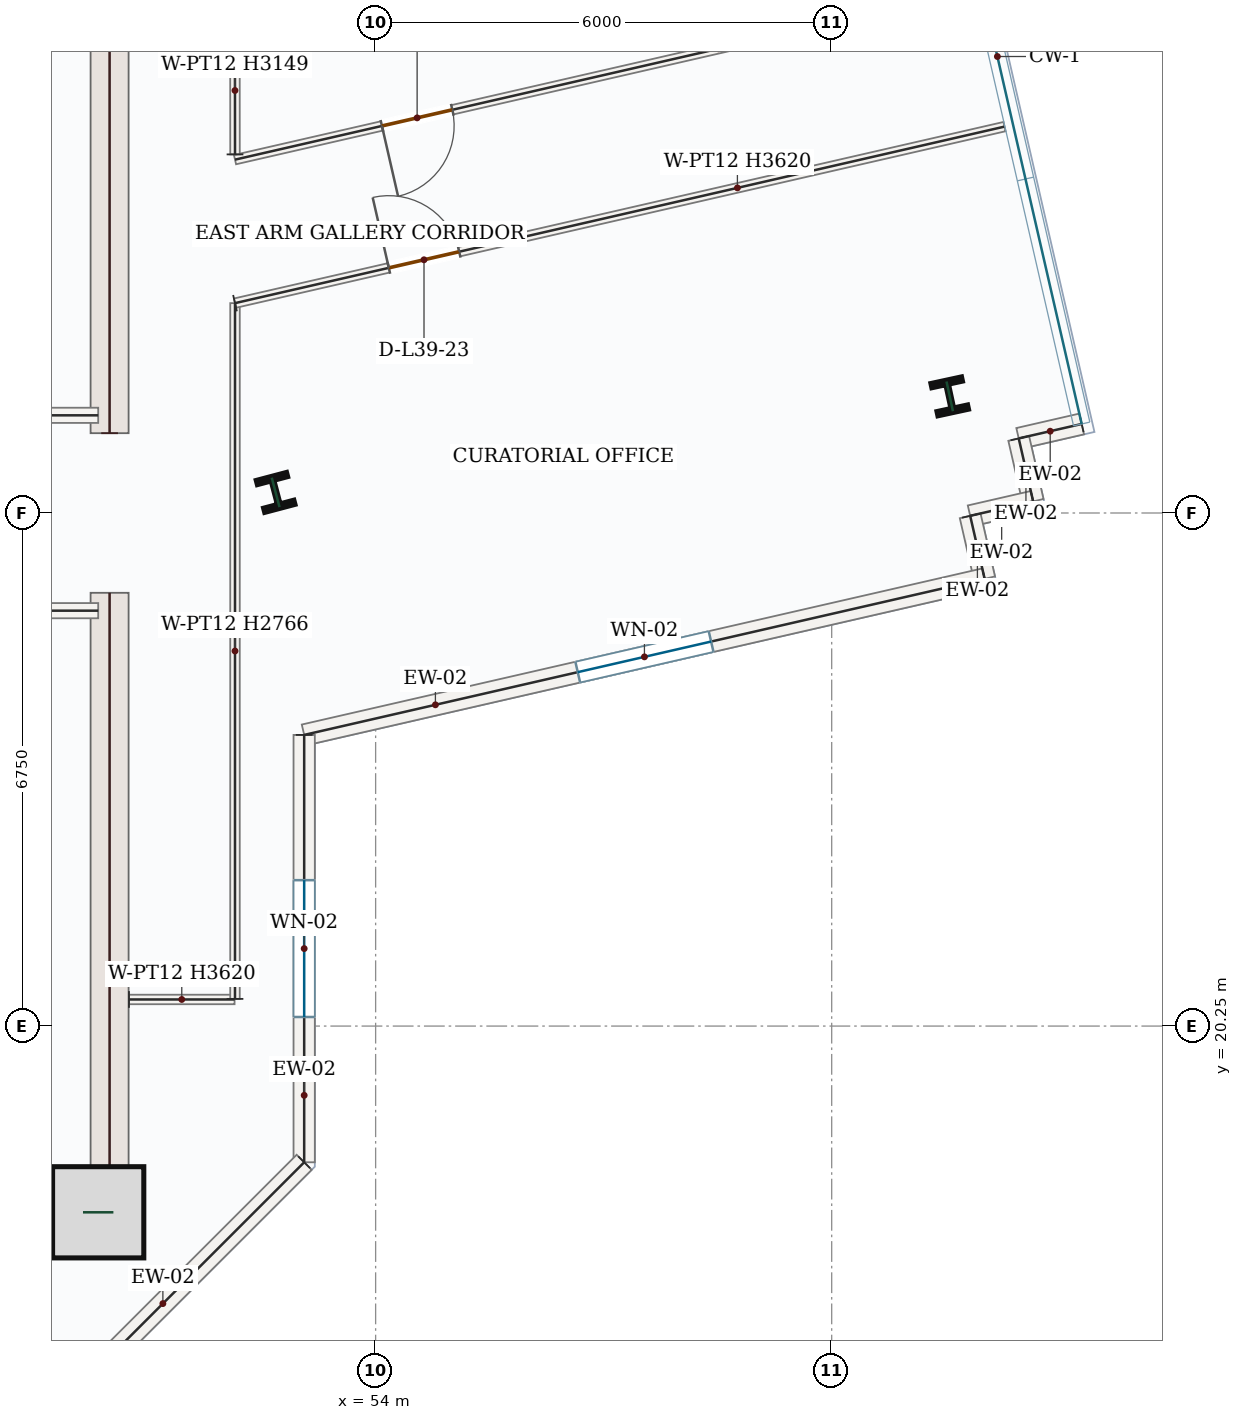
"""IFC4 building model, lengths in metres.
Left out: names, types, materials, properties, quantities, classifications, styles, units other than length and angle.
Written with IfcOpenShell. Run it as: python <this file> out.ifc"""

import sys

from ifc_helpers import new_model, si_unit, direction, frame, frame_2d, origin, origin_2d, place, context, subcontext, project, spatial, rectangle, i_section, extrude, source, transform, mapped, element, fill, save


model = new_model("IFC4")
c1 = context("Model", 3, precision=1e-05, world=origin(), true_north=direction((0.0, 1.0)))
c2 = subcontext(c1, "Body", "Model", "MODEL_VIEW")
j1 = project(units=[si_unit("LENGTHUNIT", "METRE"), si_unit("PLANEANGLEUNIT", "RADIAN")], contexts=[c1])
p1 = place(None, origin())
s1 = spatial("IfcSite", under=j1, at=p1, CompositionType="ELEMENT")
p2 = place(p1, origin())
s2 = spatial("IfcBuilding", under=s1, at=p2, CompositionType="ELEMENT")
p3 = place(p2, frame((0.0, 0.0, 170.7)))
s3 = spatial("IfcBuildingStorey", under=s2, at=p3, CompositionType="ELEMENT", Elevation=170.7)
m1 = source(origin(), c2, "Body", "SweptSolid", [
    extrude(rectangle(XDim=8.55, YDim=0.5, at=frame_2d((4.275, 0.0))), origin(), (0.0, 0.0, 1.0), 3.62),
])
for number, where, z_axis, x_axis in (
    (1, (50.5, 17.4, 0.0), (0.0, 0.0, 1.0), (0.0, 1.0, 0.0)),
    (2, (50.5, 28.05, 0.0), (0.0, 0.0, 1.0), (0.0, 1.0, 0.0)),
):
    element("IfcWall", number, at=place(p3, frame(where, z_axis=z_axis, x_axis=x_axis)), inside=s3, PredefinedType="SHEAR", context=c2, shape_type="MappedRepresentation", body=[
        mapped(m1, transform((0.0, 0.0, 0.0), x_axis=(1.0, 0.0, 0.0), y_axis=(0.0, 1.0, 0.0), z_axis=(0.0, 0.0, 1.0), scale=1.0)),
    ])
m2 = source(origin(), c2, "Body", "SweptSolid", [
    extrude(rectangle(XDim=7.0, YDim=0.5, at=frame_2d((3.5, 0.0))), origin(), (0.0, 0.0, 1.0), 3.62),
])
p4 = place(p3, frame((43.25, 17.65, 0.0), z_axis=(0.0, 0.0, 1.0), x_axis=(1.0, 0.0, 0.0)))
e3 = element("IfcWall", 3, at=p4, inside=s3, PredefinedType="SHEAR", context=c2, shape_type="MappedRepresentation", body=[
    mapped(m2, transform((0.0, 0.0, 0.0), x_axis=(1.0, 0.0, 0.0), y_axis=(0.0, 1.0, 0.0), z_axis=(0.0, 0.0, 1.0), scale=1.0)),
])
m3 = source(origin(), c2, "Body", "SweptSolid", [
    extrude(rectangle(XDim=1.2, YDim=1.2, at=origin_2d()), origin(), (0.0, 0.0, 1.0), 3.9),
])
p5 = place(p3, frame((50.35, 17.8, 0.0), z_axis=(0.0, 0.0, 1.0), x_axis=(1.0, 0.0, 0.0)))
e4 = element("IfcColumn", 4, at=p5, inside=s3, PredefinedType="COLUMN", context=c2, shape_type="MappedRepresentation", body=[
    mapped(m3, transform((0.0, 0.0, 0.0), x_axis=(1.0, 0.0, 0.0), y_axis=(0.0, 1.0, 0.0), z_axis=(0.0, 0.0, 1.0), scale=1.0)),
])
m4 = source(origin(), c2, "Body", "SweptSolid", [
    extrude(i_section(OverallWidth=0.412, OverallDepth=0.435, WebThickness=0.036, FlangeThickness=0.057, FilletRadius=0.018, at=origin_2d()), origin(), (0.0, 0.0, 1.0), 3.9),
])
for number, where, z_axis, x_axis in (
    (5, (52.684, 27.271, 0.0), (0.0, 0.0, 1.0), (0.967, 0.255, 0.0)),
    (6, (61.553, 28.535, 0.0), (0.0, 0.0, 1.0), (0.977, 0.211, 0.0)),
):
    element("IfcColumn", number, at=place(p3, frame(where, z_axis=z_axis, x_axis=x_axis)), inside=s3, PredefinedType="COLUMN", context=c2, shape_type="MappedRepresentation", body=[
        mapped(m4, transform((0.0, 0.0, 0.0), x_axis=(1.0, 0.0, 0.0), y_axis=(0.0, 1.0, 0.0), z_axis=(0.0, 0.0, 1.0), scale=1.0)),
    ])
m5 = source(origin(), c2, "Body", "SweptSolid", [
    extrude(rectangle(XDim=0.85, YDim=0.28, at=frame_2d((0.425, 0.0))), origin(), (0.0, 0.0, 1.0), 3.62),
])
p6 = place(p3, frame((63.289, 28.171, 0.0), z_axis=(0.0, 0.0, 1.0), x_axis=(-0.974704946586, -0.223495563939, 0.0)))
e7 = element("IfcWall", 7, at=p6, inside=s3, PredefinedType="SOLIDWALL", context=c2, shape_type="MappedRepresentation", body=[
    mapped(m5, transform((0.0, 0.0, 0.0), x_axis=(1.0, 0.0, 0.0), y_axis=(0.0, 1.0, 0.0), z_axis=(0.0, 0.0, 1.0), scale=1.0)),
])
m6 = source(origin(), c2, "Body", "SweptSolid", [
    extrude(rectangle(XDim=0.85, YDim=0.28, at=frame_2d((0.425, 0.0))), origin(), (0.0, 0.0, 1.0), 3.62),
])
p7 = place(p3, frame((62.461, 27.981, 0.0), z_axis=(0.0, 0.0, 1.0), x_axis=(0.22316012353, -0.974781800849, 0.0)))
e8 = element("IfcWall", 8, at=p7, inside=s3, PredefinedType="SOLIDWALL", context=c2, shape_type="MappedRepresentation", body=[
    mapped(m6, transform((0.0, 0.0, 0.0), x_axis=(1.0, 0.0, 0.0), y_axis=(0.0, 1.0, 0.0), z_axis=(0.0, 0.0, 1.0), scale=1.0)),
])
for number, where, z_axis, x_axis in (
    (9, (62.65, 27.153, 0.0), (0.0, 0.0, 1.0), (-0.975, -0.223, 0.0)),
    (10, (61.822, 26.963, 0.0), (0.0, 0.0, 1.0), (0.224, -0.975, 0.0)),
):
    element("IfcWall", number, at=place(p3, frame(where, z_axis=z_axis, x_axis=x_axis)), inside=s3, PredefinedType="SOLIDWALL", context=c2, shape_type="MappedRepresentation", body=[
        mapped(m5, transform((0.0, 0.0, 0.0), x_axis=(1.0, 0.0, 0.0), y_axis=(0.0, 1.0, 0.0), z_axis=(0.0, 0.0, 1.0), scale=1.0)),
    ])
p8 = place(p3, frame((62.012, 26.134, 0.0), z_axis=(0.0, 0.0, 1.0), x_axis=(-0.974680686557, -0.223601340005, 0.0)))
e11 = element("IfcWall", 11, at=p8, inside=s3, PredefinedType="SOLIDWALL", context=c2, shape_type="SweptSolid", body=[
    extrude(rectangle(XDim=9.185, YDim=0.28, at=frame_2d((4.592, 0.0))), origin(), (0.0, 0.0, 1.0), 3.62),
])
p9 = place(p8, frame((3.692, 0.0, 0.85)))
e12 = element("IfcOpeningElement", 12, at=p9, cuts=e11, PredefinedType="OPENING", context=c2, shape_type="SweptSolid", body=[
    extrude(rectangle(XDim=1.8, YDim=1.75, at=frame_2d((0.9, 0.875))), frame((0.0, 0.15, 0.0), z_axis=(0.0, -1.0, 0.0), x_axis=(1.0, 0.0, 0.0)), (0.0, 0.0, 1.0), 0.3),
])
p10 = place(p3, frame((53.06, 24.081, 0.0), z_axis=(0.0, 0.0, 1.0), x_axis=(0.0, -1.0, 0.0)))
e13 = element("IfcWall", 13, at=p10, inside=s3, PredefinedType="SOLIDWALL", context=c2, shape_type="SweptSolid", body=[
    extrude(rectangle(XDim=5.623, YDim=0.28, at=frame_2d((2.811, 0.0))), origin(), (0.0, 0.0, 1.0), 3.62),
])
p11 = place(p10, frame((1.911, 0.0, 0.85)))
e14 = element("IfcOpeningElement", 14, at=p11, cuts=e13, PredefinedType="OPENING", context=c2, shape_type="SweptSolid", body=[
    extrude(rectangle(XDim=1.8, YDim=1.75, at=frame_2d((0.9, 0.875))), frame((0.0, 0.15, 0.0), z_axis=(0.0, -1.0, 0.0), x_axis=(1.0, 0.0, 0.0)), (0.0, 0.0, 1.0), 0.3),
])
m7 = source(origin(), c2, "Body", "SweptSolid", [
    extrude(rectangle(XDim=5.258, YDim=0.28, at=frame_2d((2.629, 0.0))), origin(), (0.0, 0.0, 1.0), 3.62),
])
p12 = place(p3, frame((53.06, 18.458, 0.0), z_axis=(0.0, 0.0, 1.0), x_axis=(-0.707106781187, -0.707106781187, 0.0)))
e15 = element("IfcWall", 15, at=p12, inside=s3, PredefinedType="SOLIDWALL", context=c2, shape_type="MappedRepresentation", body=[
    mapped(m7, transform((0.0, 0.0, 0.0), x_axis=(1.0, 0.0, 0.0), y_axis=(0.0, 1.0, 0.0), z_axis=(0.0, 0.0, 1.0), scale=1.0)),
])
m8 = source(origin(), c2, "Body", "SweptSolid", [
    extrude(rectangle(XDim=4.25, YDim=0.2, at=frame_2d((2.125, 0.0))), origin(), (0.0, 0.0, 1.0), 3.62),
])
for number, where, z_axis, x_axis in (
    (16, (46.1, 25.715, 0.0), (0.0, 0.0, 1.0), (1.0, 0.0, 0.0)),
    (17, (46.1, 28.285, 0.0), (0.0, 0.0, 1.0), (1.0, 0.0, 0.0)),
):
    element("IfcWall", number, at=place(p3, frame(where, z_axis=z_axis, x_axis=x_axis)), inside=s3, PredefinedType="SOLIDWALL", context=c2, shape_type="MappedRepresentation", body=[
        mapped(m8, transform((0.0, 0.0, 0.0), x_axis=(1.0, 0.0, 0.0), y_axis=(0.0, 1.0, 0.0), z_axis=(0.0, 0.0, 1.0), scale=1.0)),
    ])
m9 = source(origin(), c2, "Body", "SweptSolid", [
    extrude(rectangle(XDim=1.389, YDim=0.125, at=frame_2d((0.695, 0.0))), origin(), (0.0, 0.0, 1.0), 3.62),
])
p13 = place(p3, frame((50.755, 20.6, 0.0), z_axis=(0.0, 0.0, 1.0), x_axis=(1.0, 0.0, 0.0)))
e18 = element("IfcWall", 18, at=p13, inside=s3, PredefinedType="PARTITIONING", context=c2, shape_type="MappedRepresentation", body=[
    mapped(m9, transform((0.0, 0.0, 0.0), x_axis=(1.0, 0.0, 0.0), y_axis=(0.0, 1.0, 0.0), z_axis=(0.0, 0.0, 1.0), scale=1.0)),
])
m10 = source(origin(), c2, "Body", "SweptSolid", [
    extrude(rectangle(XDim=9.153, YDim=0.125, at=frame_2d((4.577, 0.0))), origin(), (0.0, 0.0, 1.0), 2.766),
])
p14 = place(p3, frame((52.15, 20.608, 0.0), z_axis=(0.0, 0.0, 1.0), x_axis=(2.6672357e-05, 0.999999999644, 0.0)))
e19 = element("IfcWall", 19, at=p14, inside=s3, PredefinedType="PARTITIONING", context=c2, shape_type="MappedRepresentation", body=[
    mapped(m10, transform((0.0, 0.0, 0.0), x_axis=(1.0, 0.0, 0.0), y_axis=(0.0, 1.0, 0.0), z_axis=(0.0, 0.0, 1.0), scale=1.0)),
])
p15 = place(p3, frame((52.15, 29.761, 0.0), z_axis=(0.0, 0.0, 1.0), x_axis=(0.974685490502, 0.223580398525, 0.0)))
e20 = element("IfcWall", 20, at=p15, inside=s3, PredefinedType="PARTITIONING", context=c2, shape_type="SweptSolid", body=[
    extrude(rectangle(XDim=10.387, YDim=0.125, at=frame_2d((5.193, 0.0))), origin(), (0.0, 0.0, 1.0), 3.62),
])
p16 = place(p15, frame((2.076, 0.0, 0.0)))
e21 = element("IfcOpeningElement", 21, at=p16, cuts=e20, PredefinedType="OPENING", context=c2, shape_type="SweptSolid", body=[
    extrude(rectangle(XDim=0.95, YDim=2.15, at=frame_2d((0.475, 1.075))), frame((0.0, 0.073, 0.0), z_axis=(0.0, -1.0, 0.0), x_axis=(1.0, 0.0, 0.0)), (0.0, 0.0, 1.0), 0.145),
])
p17 = place(p3, frame((61.862, 33.877, 0.0), z_axis=(0.0, 0.0, 1.0), x_axis=(-0.974682727551, -0.223592443106, 0.0)))
e22 = element("IfcWall", 22, at=p17, inside=s3, PredefinedType="PARTITIONING", context=c2, shape_type="SweptSolid", body=[
    extrude(rectangle(XDim=9.965, YDim=0.125, at=frame_2d((4.982, 0.0))), origin(), (0.0, 0.0, 1.0), 3.62),
])
p18 = place(p17, frame((7.031, 0.0, 0.0)))
e23 = element("IfcOpeningElement", 23, at=p18, cuts=e22, PredefinedType="OPENING", context=c2, shape_type="SweptSolid", body=[
    extrude(rectangle(XDim=0.95, YDim=2.15, at=frame_2d((0.475, 1.075))), frame((0.0, 0.073, 0.0), z_axis=(0.0, -1.0, 0.0), x_axis=(1.0, 0.0, 0.0)), (0.0, 0.0, 1.0), 0.145),
])
m11 = source(origin(), c2, "Body", "SweptSolid", [
    extrude(rectangle(XDim=1.681, YDim=0.125, at=frame_2d((0.84, 0.0))), origin(), (0.0, 0.0, 1.0), 3.149),
])
p19 = place(p3, frame((52.15, 31.718, 0.0), z_axis=(0.0, 0.0, 1.0), x_axis=(-0.000580973032, 0.999999831235, 0.0)))
e24 = element("IfcWall", 24, at=p19, inside=s3, PredefinedType="PARTITIONING", context=c2, shape_type="MappedRepresentation", body=[
    mapped(m11, transform((0.0, 0.0, 0.0), x_axis=(1.0, 0.0, 0.0), y_axis=(0.0, 1.0, 0.0), z_axis=(0.0, 0.0, 1.0), scale=1.0)),
])
m12 = source(origin(), c2, "Body", "SweptSolid", [
    extrude(rectangle(XDim=1.8, YDim=1.75, at=frame_2d((0.9, 0.875))), frame((0.0, 0.03, 0.0), z_axis=(0.0, -1.0, 0.0), x_axis=(1.0, 0.0, 0.0)), (0.0, 0.0, 1.0), 0.06),
])
p20 = place(p9, origin())
e25 = element("IfcWindow", 25, at=p20, inside=s3, PartitioningType="DOUBLE_PANEL_VERTICAL", PredefinedType="WINDOW", context=c2, shape_type="MappedRepresentation", body=[
    mapped(m12, transform((0.0, 0.0, 0.0), x_axis=(1.0, 0.0, 0.0), y_axis=(0.0, 1.0, 0.0), z_axis=(0.0, 0.0, 1.0), scale=1.0)),
])
fill(e12, e25)
p21 = place(p11, origin())
e26 = element("IfcWindow", 26, at=p21, inside=s3, PartitioningType="DOUBLE_PANEL_VERTICAL", PredefinedType="WINDOW", context=c2, shape_type="MappedRepresentation", body=[
    mapped(m12, transform((0.0, 0.0, 0.0), x_axis=(1.0, 0.0, 0.0), y_axis=(0.0, 1.0, 0.0), z_axis=(0.0, 0.0, 1.0), scale=1.0)),
])
fill(e14, e26)
m13 = source(origin(), c2, "Body", "SweptSolid", [
    extrude(rectangle(XDim=0.95, YDim=2.15, at=frame_2d((0.475, 1.075))), frame((0.0, 0.025, 0.0), z_axis=(0.0, -1.0, 0.0), x_axis=(1.0, 0.0, 0.0)), (0.0, 0.0, 1.0), 0.05),
])
p22 = place(p16, origin())
e27 = element("IfcDoor", 27, at=p22, inside=s3, OperationType="SINGLE_SWING_LEFT", PredefinedType="DOOR", context=c2, shape_type="MappedRepresentation", body=[
    mapped(m13, transform((0.0, 0.0, 0.0), x_axis=(1.0, 0.0, 0.0), y_axis=(0.0, 1.0, 0.0), z_axis=(0.0, 0.0, 1.0), scale=1.0)),
])
fill(e21, e27)
p23 = place(p18, origin())
e28 = element("IfcDoor", 28, at=p23, inside=s3, OperationType="SINGLE_SWING_RIGHT", PredefinedType="DOOR", context=c2, shape_type="MappedRepresentation", body=[
    mapped(m13, transform((0.0, 0.0, 0.0), x_axis=(1.0, 0.0, 0.0), y_axis=(0.0, 1.0, 0.0), z_axis=(0.0, 0.0, 1.0), scale=1.0)),
])
fill(e23, e28)
save(model, sys.argv[1])
